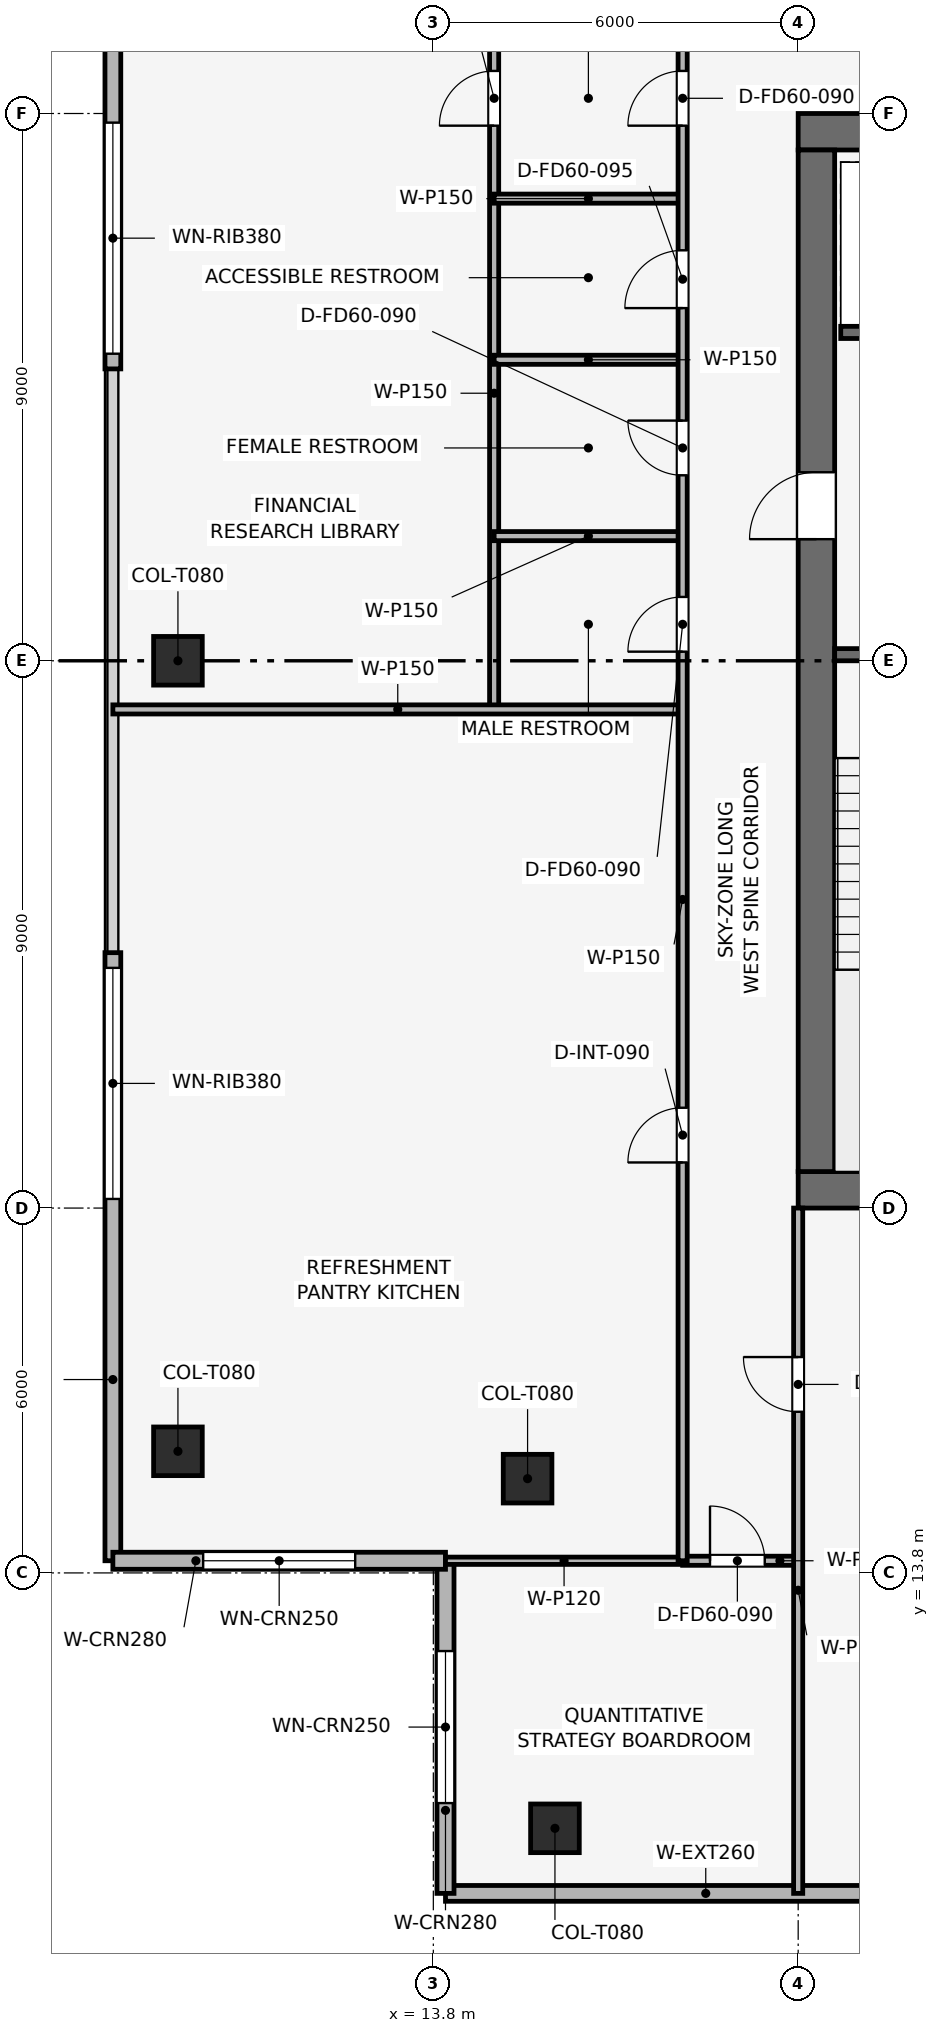
"""IFC4 building model, lengths in metres.
Left out: names, types, materials, properties, quantities, classifications, styles, units other than length and angle.
Written with IfcOpenShell. Run it as: python <this file> out.ifc"""

import sys

from ifc_helpers import new_model, si_unit, direction, frame, frame_2d, origin, origin_2d, place, context, subcontext, project, spatial, rectangle, extrude, element, fill, save


model = new_model("IFC4")
c1 = context("Model", 3, precision=1e-05, world=origin(), true_north=direction((0.0, 1.0)))
c2 = subcontext(c1, "Body", "Model", "MODEL_VIEW")
j1 = project(units=[si_unit("LENGTHUNIT", "METRE"), si_unit("PLANEANGLEUNIT", "RADIAN")], contexts=[c1])
p1 = place(None, origin())
s1 = spatial("IfcSite", under=j1, at=p1, CompositionType="ELEMENT")
p2 = place(p1, origin())
s2 = spatial("IfcBuilding", under=s1, at=p2, CompositionType="ELEMENT")
p3 = place(p2, frame((0.0, 0.0, 360.0)))
s3 = spatial("IfcBuildingStorey", under=s2, at=p3, CompositionType="ELEMENT", Elevation=360.0)
p4 = place(p3, frame((19.8, 20.1, 0.0), z_axis=(0.0, 0.0, 1.0), x_axis=(1.0, 0.0, 0.0)))
e1 = element("IfcWall", 1, at=p4, inside=s3, PredefinedType="SHEAR", context=c2, shape_type="SweptSolid", body=[
    extrude(rectangle(XDim=18.0, YDim=0.6, at=frame_2d((9.0, 0.0))), origin(), (0.0, 0.0, 1.0), 4.5),
])
p5 = place(p3, frame((19.8, 37.5, 0.0), z_axis=(0.0, 0.0, 1.0), x_axis=(1.0, 0.0, 0.0)))
e2 = element("IfcWall", 2, at=p5, inside=s3, PredefinedType="SHEAR", context=c2, shape_type="SweptSolid", body=[
    extrude(rectangle(XDim=18.0, YDim=0.6, at=frame_2d((9.0, 0.0))), origin(), (0.0, 0.0, 1.0), 4.5),
])
p6 = place(p5, frame((7.05, 0.0, 0.0)))
e3 = element("IfcOpeningElement", 3, at=p6, cuts=e2, PredefinedType="OPENING", context=c2, shape_type="SweptSolid", body=[
    extrude(rectangle(XDim=1.1, YDim=2.15, at=frame_2d((0.55, 1.075))), frame((0.0, 0.31, 0.0), z_axis=(0.0, -1.0, 0.0), x_axis=(1.0, 0.0, 0.0)), (0.0, 0.0, 1.0), 0.62),
])
p7 = place(p3, frame((20.1, 20.4, 0.0), z_axis=(0.0, 0.0, 1.0), x_axis=(0.0, 1.0, 0.0)))
e4 = element("IfcWall", 4, at=p7, inside=s3, PredefinedType="SHEAR", context=c2, shape_type="SweptSolid", body=[
    extrude(rectangle(XDim=16.8, YDim=0.6, at=frame_2d((8.4, 0.0))), origin(), (0.0, 0.0, 1.0), 4.5),
])
p8 = place(p7, frame((10.4, 0.0, 0.0)))
e5 = element("IfcOpeningElement", 5, at=p8, cuts=e4, PredefinedType="OPENING", context=c2, shape_type="SweptSolid", body=[
    extrude(rectangle(XDim=1.1, YDim=2.15, at=frame_2d((0.55, 1.075))), frame((0.0, 0.31, 0.0), z_axis=(0.0, -1.0, 0.0), x_axis=(1.0, 0.0, 0.0)), (0.0, 0.0, 1.0), 0.62),
])
for number, where, z_axis, x_axis in (
    (6, (15.8, 9.6, 0.003), (0.0, 0.0, 1.0), (1.0, 0.0, 0.0)),
    (7, (9.6, 28.8, 0.003), (0.0, 0.0, 1.0), (1.0, 0.0, 0.0)),
    (8, (9.6, 15.8, 0.003), (0.0, 0.0, 1.0), (1.0, 0.0, 0.0)),
    (9, (15.35, 15.35, 0.003), (0.0, 0.0, 1.0), (1.0, 0.0, 0.0)),
):
    element("IfcColumn", number, at=place(p3, frame(where, z_axis=z_axis, x_axis=x_axis)), inside=s3, PredefinedType="COLUMN", context=c2, shape_type="SweptSolid", body=[
        extrude(rectangle(XDim=0.8, YDim=0.8, at=origin_2d()), origin(), (0.0, 0.0, 1.0), 4.234),
    ])
p9 = place(p3, frame((24.0, 8.53, 0.0), z_axis=(0.0, 0.0, 1.0), x_axis=(-1.0, 0.0, 0.0)))
e10 = element("IfcWall", 10, at=p9, inside=s3, PredefinedType="SOLIDWALL", context=c2, shape_type="SweptSolid", body=[
    extrude(rectangle(XDim=10.0, YDim=0.26, at=frame_2d((5.0, 0.0))), origin(), (0.0, 0.0, 1.0), 4.24),
])
p10 = place(p9, frame((0.25, 0.0, 0.9)))
e11 = element("IfcOpeningElement", 11, at=p10, cuts=e10, PredefinedType="OPENING", context=c2, shape_type="SweptSolid", body=[
    extrude(rectangle(XDim=1.2, YDim=2.1, at=frame_2d((0.6, 1.05))), frame((0.0, 0.14, 0.0), z_axis=(0.0, -1.0, 0.0), x_axis=(1.0, 0.0, 0.0)), (0.0, 0.0, 1.0), 0.28),
])
p11 = place(p3, frame((8.53, 14.0, 0.0), z_axis=(0.0, 0.0, 1.0), x_axis=(0.0, 1.0, 0.0)))
e12 = element("IfcWall", 12, at=p11, inside=s3, PredefinedType="SOLIDWALL", context=c2, shape_type="SweptSolid", body=[
    extrude(rectangle(XDim=10.0, YDim=0.26, at=frame_2d((5.0, 0.0))), origin(), (0.0, 0.0, 1.0), 4.24),
])
p12 = place(p11, frame((5.95, 0.0, 0.9)))
e13 = element("IfcOpeningElement", 13, at=p12, cuts=e12, PredefinedType="OPENING", context=c2, shape_type="SweptSolid", body=[
    extrude(rectangle(XDim=3.8, YDim=1.9, at=frame_2d((1.9, 0.95))), frame((0.0, 0.14, 0.0), z_axis=(0.0, -1.0, 0.0), x_axis=(1.0, 0.0, 0.0)), (0.0, 0.0, 1.0), 0.28),
])
p13 = place(p3, frame((8.53, 33.6, 0.0), z_axis=(0.0, 0.0, 1.0), x_axis=(0.0, 1.0, 0.0)))
e14 = element("IfcWall", 14, at=p13, inside=s3, PredefinedType="SOLIDWALL", context=c2, shape_type="SweptSolid", body=[
    extrude(rectangle(XDim=10.0, YDim=0.26, at=frame_2d((5.0, 0.0))), origin(), (0.0, 0.0, 1.0), 4.24),
])
p14 = place(p13, frame((0.25, 0.0, 0.9)))
e15 = element("IfcOpeningElement", 15, at=p14, cuts=e14, PredefinedType="OPENING", context=c2, shape_type="SweptSolid", body=[
    extrude(rectangle(XDim=3.8, YDim=1.9, at=frame_2d((1.9, 0.95))), frame((0.0, 0.14, 0.0), z_axis=(0.0, -1.0, 0.0), x_axis=(1.0, 0.0, 0.0)), (0.0, 0.0, 1.0), 0.28),
])
p15 = place(p3, frame((14.0, 8.53, 0.0), z_axis=(0.0, 0.0, 1.0), x_axis=(0.0, 1.0, 0.0)))
e16 = element("IfcWall", 16, at=p15, inside=s3, PredefinedType="SOLIDWALL", context=c2, shape_type="SweptSolid", body=[
    extrude(rectangle(XDim=5.47, YDim=0.28, at=frame_2d((2.735, 0.0))), origin(), (0.0, 0.0, 1.0), 4.24),
])
p16 = place(p15, frame((1.485, 0.0, 0.9)))
e17 = element("IfcOpeningElement", 17, at=p16, cuts=e16, PredefinedType="OPENING", context=c2, shape_type="SweptSolid", body=[
    extrude(rectangle(XDim=2.5, YDim=1.9, at=frame_2d((1.25, 0.95))), frame((0.0, 0.15, 0.0), z_axis=(0.0, -1.0, 0.0), x_axis=(1.0, 0.0, 0.0)), (0.0, 0.0, 1.0), 0.3),
])
p17 = place(p3, frame((14.0, 14.0, 0.0), z_axis=(0.0, 0.0, 1.0), x_axis=(-1.0, 0.0, 0.0)))
e18 = element("IfcWall", 18, at=p17, inside=s3, PredefinedType="SOLIDWALL", context=c2, shape_type="SweptSolid", body=[
    extrude(rectangle(XDim=5.47, YDim=0.28, at=frame_2d((2.735, 0.0))), origin(), (0.0, 0.0, 1.0), 4.24),
])
p18 = place(p17, frame((1.485, 0.0, 0.9)))
e19 = element("IfcOpeningElement", 19, at=p18, cuts=e18, PredefinedType="OPENING", context=c2, shape_type="SweptSolid", body=[
    extrude(rectangle(XDim=2.5, YDim=1.9, at=frame_2d((1.25, 0.95))), frame((0.0, 0.15, 0.0), z_axis=(0.0, -1.0, 0.0), x_axis=(1.0, 0.0, 0.0)), (0.0, 0.0, 1.0), 0.3),
])
p19 = place(p3, frame((20.4, 28.9, 0.0), z_axis=(0.0, 0.0, 1.0), x_axis=(1.0, 0.0, 0.0)))
e20 = element("IfcWall", 20, at=p19, inside=s3, PredefinedType="SHEAR", context=c2, shape_type="SweptSolid", body=[
    extrude(rectangle(XDim=3.15, YDim=0.2, at=frame_2d((1.575, 0.0))), origin(), (0.0, 0.0, 1.0), 4.24),
])
p20 = place(p19, frame((0.8, 0.0, 0.0)))
e21 = element("IfcOpeningElement", 21, at=p20, cuts=e20, PredefinedType="OPENING", context=c2, shape_type="SweptSolid", body=[
    extrude(rectangle(XDim=1.0, YDim=2.1, at=frame_2d((0.5, 1.05))), frame((0.0, 0.11, 0.0), z_axis=(0.0, -1.0, 0.0), x_axis=(1.0, 0.0, 0.0)), (0.0, 0.0, 1.0), 0.22),
])
p21 = place(p3, frame((20.5, 34.2, 0.0), z_axis=(0.0, 0.0, 1.0), x_axis=(1.0, 0.0, 0.0)))
e22 = element("IfcWall", 22, at=p21, inside=s3, PredefinedType="SHEAR", context=c2, shape_type="SweptSolid", body=[
    extrude(rectangle(XDim=3.05, YDim=0.2, at=frame_2d((1.525, 0.0))), origin(), (0.0, 0.0, 1.0), 4.24),
])
p22 = place(p21, frame((0.75, 0.0, 0.0)))
e23 = element("IfcOpeningElement", 23, at=p22, cuts=e22, PredefinedType="OPENING", context=c2, shape_type="SweptSolid", body=[
    extrude(rectangle(XDim=1.1, YDim=2.15, at=frame_2d((0.55, 1.075))), frame((0.0, 0.11, 0.0), z_axis=(0.0, -1.0, 0.0), x_axis=(1.0, 0.0, 0.0)), (0.0, 0.0, 1.0), 0.22),
])
p23 = place(p3, frame((14.8, 28.0, 0.0), z_axis=(0.0, 0.0, 1.0), x_axis=(0.0, 1.0, 0.0)))
e24 = element("IfcWall", 24, at=p23, inside=s3, PredefinedType="PARTITIONING", context=c2, shape_type="SweptSolid", body=[
    extrude(rectangle(XDim=11.7, YDim=0.15, at=frame_2d((5.85, 0.0))), origin(), (0.0, 0.0, 1.0), 3.825),
])
p24 = place(p23, frame((9.6, 0.0, 0.0)))
e25 = element("IfcOpeningElement", 25, at=p24, cuts=e24, PredefinedType="OPENING", context=c2, shape_type="SweptSolid", body=[
    extrude(rectangle(XDim=0.9, YDim=2.1, at=frame_2d((0.45, 1.05))), frame((0.0, 0.085, 0.0), z_axis=(0.0, -1.0, 0.0), x_axis=(1.0, 0.0, 0.0)), (0.0, 0.0, 1.0), 0.17),
])
p25 = place(p3, frame((8.53, 28.0, 0.0), z_axis=(0.0, 0.0, 1.0), x_axis=(1.0, 0.0, 0.0)))
e26 = element("IfcWall", 26, at=p25, inside=s3, PredefinedType="PARTITIONING", context=c2, shape_type="SweptSolid", body=[
    extrude(rectangle(XDim=9.37, YDim=0.15, at=frame_2d((4.685, 0.0))), origin(), (0.0, 0.0, 1.0), 3.865),
])
for number, where, z_axis, x_axis in (
    (27, (14.8, 36.4, 0.0), (0.0, 0.0, 1.0), (1.0, 0.0, 0.0)),
    (28, (14.8, 30.85, 0.0), (0.0, 0.0, 1.0), (1.0, 0.0, 0.0)),
    (29, (14.8, 33.75, 0.0), (0.0, 0.0, 1.0), (1.0, 0.0, 0.0)),
):
    element("IfcWall", number, at=place(p3, frame(where, z_axis=z_axis, x_axis=x_axis)), inside=s3, PredefinedType="PARTITIONING", context=c2, shape_type="SweptSolid", body=[
        extrude(rectangle(XDim=3.1, YDim=0.15, at=frame_2d((1.55, 0.0))), origin(), (0.0, 0.0, 1.0), 3.865),
    ])
p26 = place(p3, frame((14.0, 14.0, 0.0), z_axis=(0.0, 0.0, 1.0), x_axis=(1.0, 0.0, 0.0)))
e30 = element("IfcWall", 30, at=p26, inside=s3, PredefinedType="PARTITIONING", context=c2, shape_type="SweptSolid", body=[
    extrude(rectangle(XDim=3.9, YDim=0.12, at=frame_2d((1.95, 0.0))), origin(), (0.0, 0.0, 1.0), 3.925),
])
p27 = place(p3, frame((17.9, 14.0, 0.0), z_axis=(0.0, 0.0, 1.0), x_axis=(1.0, 0.0, 0.0)))
e31 = element("IfcWall", 31, at=p27, inside=s3, PredefinedType="PARTITIONING", context=c2, shape_type="SweptSolid", body=[
    extrude(rectangle(XDim=1.9, YDim=0.15, at=frame_2d((0.95, 0.0))), origin(), (0.0, 0.0, 1.0), 4.24),
])
p28 = place(p27, frame((0.45, 0.0, 0.0)))
e32 = element("IfcOpeningElement", 32, at=p28, cuts=e31, PredefinedType="OPENING", context=c2, shape_type="SweptSolid", body=[
    extrude(rectangle(XDim=0.9, YDim=2.1, at=frame_2d((0.45, 1.05))), frame((0.0, 0.085, 0.0), z_axis=(0.0, -1.0, 0.0), x_axis=(1.0, 0.0, 0.0)), (0.0, 0.0, 1.0), 0.17),
])
p29 = place(p3, frame((19.8, 8.53, 0.0), z_axis=(0.0, 0.0, 1.0), x_axis=(0.0, 1.0, 0.0)))
e33 = element("IfcWall", 33, at=p29, inside=s3, PredefinedType="PARTITIONING", context=c2, shape_type="SweptSolid", body=[
    extrude(rectangle(XDim=11.27, YDim=0.15, at=frame_2d((5.635, 0.0))), origin(), (0.0, 0.0, 1.0), 3.825),
])
p30 = place(p29, frame((7.92, 0.0, 0.0)))
e34 = element("IfcOpeningElement", 34, at=p30, cuts=e33, PredefinedType="OPENING", context=c2, shape_type="SweptSolid", body=[
    extrude(rectangle(XDim=0.9, YDim=2.1, at=frame_2d((0.45, 1.05))), frame((0.0, 0.085, 0.0), z_axis=(0.0, -1.0, 0.0), x_axis=(1.0, 0.0, 0.0)), (0.0, 0.0, 1.0), 0.17),
])
p31 = place(p3, frame((17.9, 14.0, 0.0), z_axis=(0.0, 0.0, 1.0), x_axis=(0.0, 1.0, 0.0)))
e35 = element("IfcWall", 35, at=p31, inside=s3, PredefinedType="PARTITIONING", context=c2, shape_type="SweptSolid", body=[
    extrude(rectangle(XDim=25.7, YDim=0.15, at=frame_2d((12.85, 0.0))), origin(), (0.0, 0.0, 1.0), 3.825),
])
p32 = place(p31, frame((6.55, 0.0, 0.0)))
e36 = element("IfcOpeningElement", 36, at=p32, cuts=e35, PredefinedType="OPENING", context=c2, shape_type="SweptSolid", body=[
    extrude(rectangle(XDim=0.9, YDim=2.1, at=frame_2d((0.45, 1.05))), frame((0.0, 0.085, 0.0), z_axis=(0.0, -1.0, 0.0), x_axis=(1.0, 0.0, 0.0)), (0.0, 0.0, 1.0), 0.17),
])
p33 = place(p31, frame((14.95, 0.0, 0.0)))
e37 = element("IfcOpeningElement", 37, at=p33, cuts=e35, PredefinedType="OPENING", context=c2, shape_type="SweptSolid", body=[
    extrude(rectangle(XDim=0.9, YDim=2.1, at=frame_2d((0.45, 1.05))), frame((0.0, 0.085, 0.0), z_axis=(0.0, -1.0, 0.0), x_axis=(1.0, 0.0, 0.0)), (0.0, 0.0, 1.0), 0.17),
])
p34 = place(p31, frame((17.85, 0.0, 0.0)))
e38 = element("IfcOpeningElement", 38, at=p34, cuts=e35, PredefinedType="OPENING", context=c2, shape_type="SweptSolid", body=[
    extrude(rectangle(XDim=0.9, YDim=2.1, at=frame_2d((0.45, 1.05))), frame((0.0, 0.085, 0.0), z_axis=(0.0, -1.0, 0.0), x_axis=(1.0, 0.0, 0.0)), (0.0, 0.0, 1.0), 0.17),
])
p35 = place(p31, frame((20.6, 0.0, 0.0)))
e39 = element("IfcOpeningElement", 39, at=p35, cuts=e35, PredefinedType="OPENING", context=c2, shape_type="SweptSolid", body=[
    extrude(rectangle(XDim=0.95, YDim=2.1, at=frame_2d((0.475, 1.05))), frame((0.0, 0.085, 0.0), z_axis=(0.0, -1.0, 0.0), x_axis=(1.0, 0.0, 0.0)), (0.0, 0.0, 1.0), 0.17),
])
p36 = place(p31, frame((23.6, 0.0, 0.0)))
e40 = element("IfcOpeningElement", 40, at=p36, cuts=e35, PredefinedType="OPENING", context=c2, shape_type="SweptSolid", body=[
    extrude(rectangle(XDim=0.9, YDim=2.1, at=frame_2d((0.45, 1.05))), frame((0.0, 0.085, 0.0), z_axis=(0.0, -1.0, 0.0), x_axis=(1.0, 0.0, 0.0)), (0.0, 0.0, 1.0), 0.17),
])
p37 = place(p12, origin())
e41 = element("IfcWindow", 41, at=p37, inside=s3, PartitioningType="SINGLE_PANEL", PredefinedType="WINDOW", context=c2, shape_type="SweptSolid", body=[
    extrude(rectangle(XDim=3.8, YDim=1.9, at=frame_2d((1.9, 0.95))), frame((0.0, 0.03, 0.0), z_axis=(0.0, -1.0, 0.0), x_axis=(1.0, 0.0, 0.0)), (0.0, 0.0, 1.0), 0.06),
])
fill(e13, e41)
p38 = place(p14, origin())
e42 = element("IfcWindow", 42, at=p38, inside=s3, PartitioningType="SINGLE_PANEL", PredefinedType="WINDOW", context=c2, shape_type="SweptSolid", body=[
    extrude(rectangle(XDim=3.8, YDim=1.9, at=frame_2d((1.9, 0.95))), frame((0.0, 0.03, 0.0), z_axis=(0.0, -1.0, 0.0), x_axis=(1.0, 0.0, 0.0)), (0.0, 0.0, 1.0), 0.06),
])
fill(e15, e42)
p39 = place(p16, origin())
e43 = element("IfcWindow", 43, at=p39, inside=s3, PartitioningType="SINGLE_PANEL", PredefinedType="WINDOW", context=c2, shape_type="SweptSolid", body=[
    extrude(rectangle(XDim=2.5, YDim=1.9, at=frame_2d((1.25, 0.95))), frame((0.0, 0.03, 0.0), z_axis=(0.0, -1.0, 0.0), x_axis=(1.0, 0.0, 0.0)), (0.0, 0.0, 1.0), 0.06),
])
fill(e17, e43)
p40 = place(p18, origin())
e44 = element("IfcWindow", 44, at=p40, inside=s3, PartitioningType="SINGLE_PANEL", PredefinedType="WINDOW", context=c2, shape_type="SweptSolid", body=[
    extrude(rectangle(XDim=2.5, YDim=1.9, at=frame_2d((1.25, 0.95))), frame((0.0, 0.03, 0.0), z_axis=(0.0, -1.0, 0.0), x_axis=(1.0, 0.0, 0.0)), (0.0, 0.0, 1.0), 0.06),
])
fill(e19, e44)
p41 = place(p24, origin())
e45 = element("IfcDoor", 45, at=p41, inside=s3, OperationType="SINGLE_SWING_LEFT", PredefinedType="DOOR", context=c2, shape_type="SweptSolid", body=[
    extrude(rectangle(XDim=0.9, YDim=2.1, at=frame_2d((0.45, 1.05))), frame((0.0, 0.025, 0.0), z_axis=(0.0, -1.0, 0.0), x_axis=(1.0, 0.0, 0.0)), (0.0, 0.0, 1.0), 0.05),
])
fill(e25, e45)
p42 = place(p28, origin())
e46 = element("IfcDoor", 46, at=p42, inside=s3, OperationType="SINGLE_SWING_LEFT", PredefinedType="DOOR", context=c2, shape_type="SweptSolid", body=[
    extrude(rectangle(XDim=0.9, YDim=2.1, at=frame_2d((0.45, 1.05))), frame((0.0, 0.025, 0.0), z_axis=(0.0, -1.0, 0.0), x_axis=(1.0, 0.0, 0.0)), (0.0, 0.0, 1.0), 0.05),
])
fill(e32, e46)
p43 = place(p30, origin())
e47 = element("IfcDoor", 47, at=p43, inside=s3, OperationType="SINGLE_SWING_RIGHT", PredefinedType="DOOR", context=c2, shape_type="SweptSolid", body=[
    extrude(rectangle(XDim=0.9, YDim=2.1, at=frame_2d((0.45, 1.05))), frame((0.0, 0.025, 0.0), z_axis=(0.0, -1.0, 0.0), x_axis=(1.0, 0.0, 0.0)), (0.0, 0.0, 1.0), 0.05),
])
fill(e34, e47)
p44 = place(p32, origin())
e48 = element("IfcDoor", 48, at=p44, inside=s3, OperationType="SINGLE_SWING_LEFT", PredefinedType="DOOR", context=c2, shape_type="SweptSolid", body=[
    extrude(rectangle(XDim=0.9, YDim=2.1, at=frame_2d((0.45, 1.05))), frame((0.0, 0.025, 0.0), z_axis=(0.0, -1.0, 0.0), x_axis=(1.0, 0.0, 0.0)), (0.0, 0.0, 1.0), 0.05),
])
fill(e36, e48)
p45 = place(p33, origin())
e49 = element("IfcDoor", 49, at=p45, inside=s3, OperationType="SINGLE_SWING_LEFT", PredefinedType="DOOR", context=c2, shape_type="SweptSolid", body=[
    extrude(rectangle(XDim=0.9, YDim=2.1, at=frame_2d((0.45, 1.05))), frame((0.0, 0.025, 0.0), z_axis=(0.0, -1.0, 0.0), x_axis=(1.0, 0.0, 0.0)), (0.0, 0.0, 1.0), 0.05),
])
fill(e37, e49)
p46 = place(p34, origin())
e50 = element("IfcDoor", 50, at=p46, inside=s3, OperationType="SINGLE_SWING_RIGHT", PredefinedType="DOOR", context=c2, shape_type="SweptSolid", body=[
    extrude(rectangle(XDim=0.9, YDim=2.1, at=frame_2d((0.45, 1.05))), frame((0.0, 0.025, 0.0), z_axis=(0.0, -1.0, 0.0), x_axis=(1.0, 0.0, 0.0)), (0.0, 0.0, 1.0), 0.05),
])
fill(e38, e50)
p47 = place(p35, origin())
e51 = element("IfcDoor", 51, at=p47, inside=s3, OperationType="SINGLE_SWING_LEFT", PredefinedType="DOOR", context=c2, shape_type="SweptSolid", body=[
    extrude(rectangle(XDim=0.95, YDim=2.1, at=frame_2d((0.475, 1.05))), frame((0.0, 0.025, 0.0), z_axis=(0.0, -1.0, 0.0), x_axis=(1.0, 0.0, 0.0)), (0.0, 0.0, 1.0), 0.05),
])
fill(e39, e51)
p48 = place(p36, origin())
e52 = element("IfcDoor", 52, at=p48, inside=s3, OperationType="SINGLE_SWING_LEFT", PredefinedType="DOOR", context=c2, shape_type="SweptSolid", body=[
    extrude(rectangle(XDim=0.9, YDim=2.1, at=frame_2d((0.45, 1.05))), frame((0.0, 0.025, 0.0), z_axis=(0.0, -1.0, 0.0), x_axis=(1.0, 0.0, 0.0)), (0.0, 0.0, 1.0), 0.05),
])
fill(e40, e52)
p49 = place(p8, origin())
e53 = element("IfcDoor", 53, at=p49, inside=s3, OperationType="SINGLE_SWING_LEFT", PredefinedType="DOOR", context=c2, shape_type="SweptSolid", body=[
    extrude(rectangle(XDim=1.1, YDim=2.15, at=frame_2d((0.55, 1.075))), frame((0.0, 0.025, 0.0), z_axis=(0.0, -1.0, 0.0), x_axis=(1.0, 0.0, 0.0)), (0.0, 0.0, 1.0), 0.05),
])
fill(e5, e53)
save(model, sys.argv[1])
